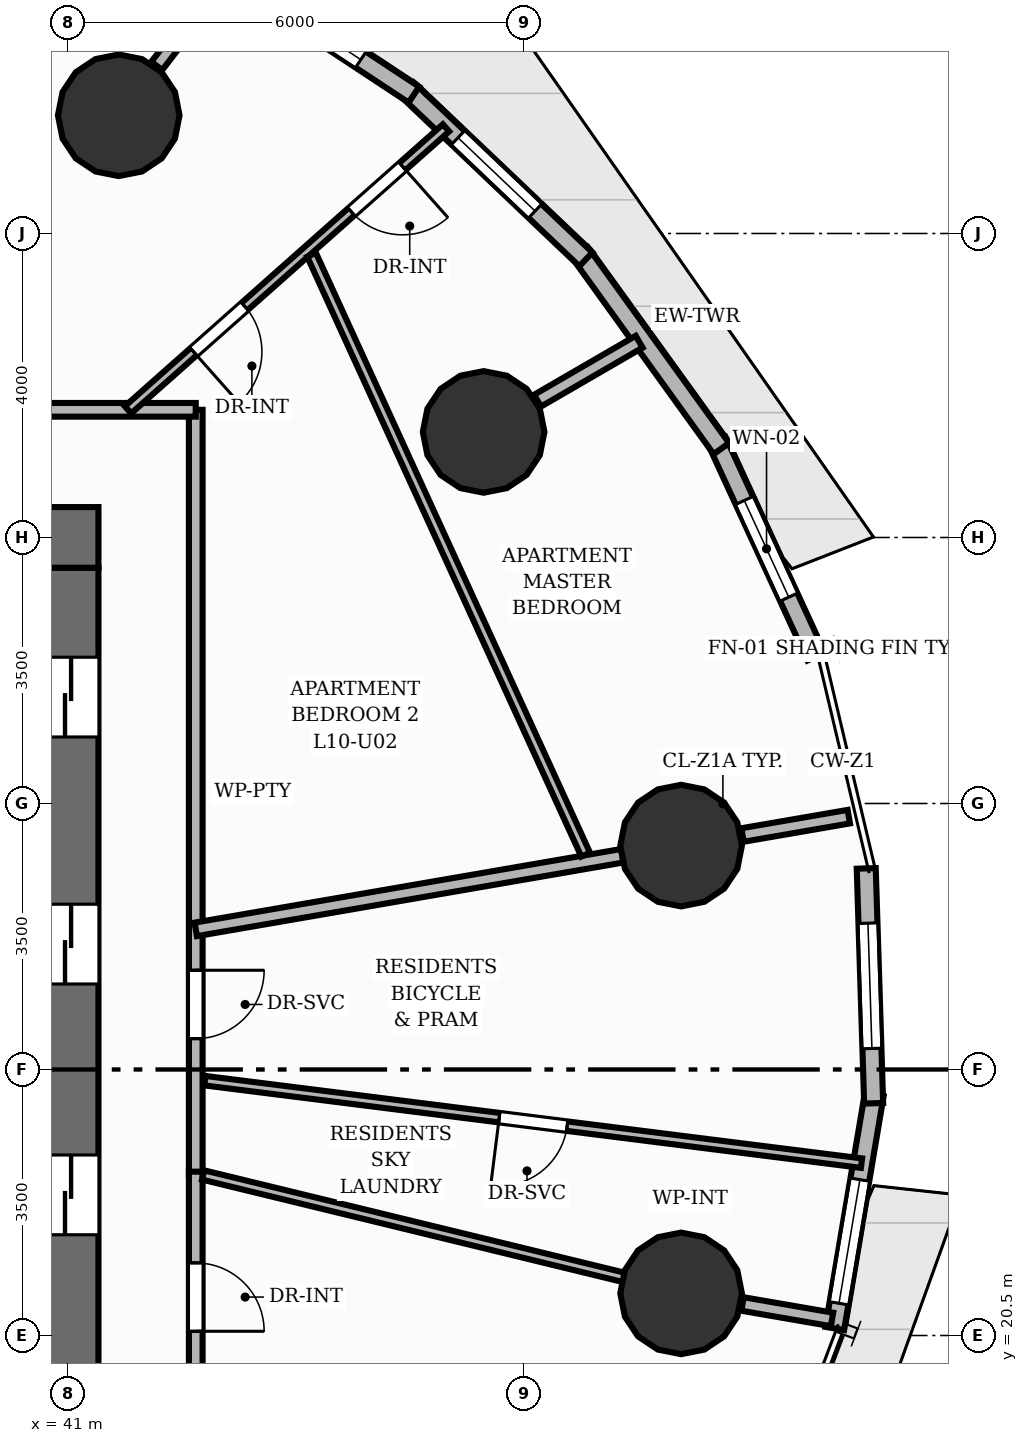
"""IFC4 building model, lengths in metres.
Left out: names, types, materials, properties, quantities, classifications, styles, units other than length and angle.
Written with IfcOpenShell. Run it as: python <this file> out.ifc"""

import sys

from ifc_helpers import new_model, si_unit, direction, frame, frame_2d, origin, origin_2d, place, context, subcontext, project, spatial, rectangle, circle, extrude, element, fill, save


model = new_model("IFC4")
c1 = context("Model", 3, precision=1e-05, world=origin(), true_north=direction((0.0, 1.0)))
c2 = subcontext(c1, "Body", "Model", "MODEL_VIEW")
j1 = project(units=[si_unit("LENGTHUNIT", "METRE"), si_unit("PLANEANGLEUNIT", "RADIAN")], contexts=[c1])
p1 = place(None, origin())
s1 = spatial("IfcSite", under=j1, at=p1, CompositionType="ELEMENT")
p2 = place(p1, origin())
s2 = spatial("IfcBuilding", under=s1, at=p2, CompositionType="ELEMENT")
p3 = place(p2, frame((0.0, 0.0, 37.6)))
s3 = spatial("IfcBuildingStorey", under=s2, at=p3, CompositionType="ELEMENT", Elevation=37.6)
p4 = place(p3, frame((22.6, 31.0, 0.0), z_axis=(0.0, 0.0, 1.0), x_axis=(1.0, 0.0, 0.0)))
e1 = element("IfcWall", 1, at=p4, inside=s3, PredefinedType="SHEAR", context=c2, shape_type="SweptSolid", body=[
    extrude(rectangle(XDim=18.8, YDim=0.8, at=frame_2d((9.4, 0.0))), origin(), (0.0, 0.0, 1.0), 3.2),
])
p5 = place(p4, frame((11.8, 0.0, 0.0)))
e2 = element("IfcOpeningElement", 2, at=p5, cuts=e1, PredefinedType="OPENING", context=c2, shape_type="SweptSolid", body=[
    extrude(rectangle(XDim=1.1, YDim=2.15, at=frame_2d((0.55, 1.075))), frame((0.0, 0.41, 0.0), z_axis=(0.0, -1.0, 0.0), x_axis=(1.0, 0.0, 0.0)), (0.0, 0.0, 1.0), 0.82),
])
p6 = place(p3, frame((41.0, 17.4, 0.0), z_axis=(0.0, 0.0, 1.0), x_axis=(0.0, 1.0, 0.0)))
e3 = element("IfcWall", 3, at=p6, inside=s3, PredefinedType="SHEAR", context=c2, shape_type="SweptSolid", body=[
    extrude(rectangle(XDim=13.2, YDim=0.8, at=frame_2d((6.6, 0.0))), origin(), (0.0, 0.0, 1.0), 3.2),
])
p7 = place(p6, frame((1.175, 0.0, 0.0)))
e4 = element("IfcOpeningElement", 4, at=p7, cuts=e3, PredefinedType="OPENING", context=c2, shape_type="SweptSolid", body=[
    extrude(rectangle(XDim=1.05, YDim=2.15, at=frame_2d((0.525, 1.075))), frame((0.0, 0.41, 0.0), z_axis=(0.0, -1.0, 0.0), x_axis=(1.0, 0.0, 0.0)), (0.0, 0.0, 1.0), 0.82),
])
p8 = place(p6, frame((4.425, 0.0, 0.0)))
e5 = element("IfcOpeningElement", 5, at=p8, cuts=e3, PredefinedType="OPENING", context=c2, shape_type="SweptSolid", body=[
    extrude(rectangle(XDim=1.05, YDim=2.15, at=frame_2d((0.525, 1.075))), frame((0.0, 0.41, 0.0), z_axis=(0.0, -1.0, 0.0), x_axis=(1.0, 0.0, 0.0)), (0.0, 0.0, 1.0), 0.82),
])
p9 = place(p6, frame((7.725, 0.0, 0.0)))
e6 = element("IfcOpeningElement", 6, at=p9, cuts=e3, PredefinedType="OPENING", context=c2, shape_type="SweptSolid", body=[
    extrude(rectangle(XDim=1.05, YDim=2.15, at=frame_2d((0.525, 1.075))), frame((0.0, 0.41, 0.0), z_axis=(0.0, -1.0, 0.0), x_axis=(1.0, 0.0, 0.0)), (0.0, 0.0, 1.0), 0.82),
])
p10 = place(p6, frame((10.975, 0.0, 0.0)))
e7 = element("IfcOpeningElement", 7, at=p10, cuts=e3, PredefinedType="OPENING", context=c2, shape_type="SweptSolid", body=[
    extrude(rectangle(XDim=1.05, YDim=2.15, at=frame_2d((0.525, 1.075))), frame((0.0, 0.41, 0.0), z_axis=(0.0, -1.0, 0.0), x_axis=(1.0, 0.0, 0.0)), (0.0, 0.0, 1.0), 0.82),
])
for number, where, z_axis, x_axis in (
    (8, (49.066, 26.946, 0.0), (0.0, 0.0, 1.0), (1.0, 0.0, 0.0)),
    (9, (46.468, 32.389, 0.0), (0.0, 0.0, 1.0), (1.0, 0.0, 0.0)),
    (10, (41.667, 36.555, 0.0), (0.0, 0.0, 1.0), (1.0, 0.0, 0.0)),
    (11, (49.066, 21.054, 0.0), (0.0, 0.0, 1.0), (1.0, 0.0, 0.0)),
):
    element("IfcColumn", number, at=place(p3, frame(where, z_axis=z_axis, x_axis=x_axis)), inside=s3, PredefinedType="COLUMN", context=c2, shape_type="SweptSolid", body=[
        extrude(circle(Radius=0.8, at=origin_2d()), origin(), (0.0, 0.0, 1.0), 3.2),
    ])
p11 = place(p3, frame((49.538, 32.268, 0.0), z_axis=(0.0, 0.0, 1.0), x_axis=(0.417872029175, -0.908505898293, 0.0)))
e12 = element("IfcWall", 12, at=p11, inside=s3, PredefinedType="SOLIDWALL", context=c2, shape_type="SweptSolid", body=[
    extrude(rectangle(XDim=3.12, YDim=0.25, at=frame_2d((1.56, 0.0))), origin(), (0.0, 0.0, 1.0), 2.96),
])
p12 = place(p11, frame((0.86, 0.0, 0.85)))
e13 = element("IfcOpeningElement", 13, at=p12, cuts=e12, PredefinedType="OPENING", context=c2, shape_type="SweptSolid", body=[
    extrude(rectangle(XDim=1.4, YDim=1.55, at=frame_2d((0.7, 0.775))), frame((0.0, 0.135, 0.0), z_axis=(0.0, -1.0, 0.0), x_axis=(1.0, 0.0, 0.0)), (0.0, 0.0, 1.0), 0.27),
])
p13 = place(p3, frame((47.739, 34.745, 0.0), z_axis=(0.0, 0.0, 1.0), x_axis=(0.584805106467, -0.811173833066, 0.0)))
e14 = element("IfcWall", 14, at=p13, inside=s3, PredefinedType="SOLIDWALL", context=c2, shape_type="SweptSolid", body=[
    extrude(rectangle(XDim=3.174, YDim=0.25, at=frame_2d((1.587, 0.0))), origin(), (0.0, 0.0, 1.0), 2.96),
])
p14 = place(p3, frame((45.462, 36.896, 0.0), z_axis=(0.0, 0.0, 1.0), x_axis=(0.724569059836, -0.689202203659, 0.0)))
e15 = element("IfcWall", 15, at=p14, inside=s3, PredefinedType="SOLIDWALL", context=c2, shape_type="SweptSolid", body=[
    extrude(rectangle(XDim=3.244, YDim=0.25, at=frame_2d((1.622, 0.0))), origin(), (0.0, 0.0, 1.0), 2.96),
])
p15 = place(p14, frame((0.922, 0.0, 0.85)))
e16 = element("IfcOpeningElement", 16, at=p15, cuts=e15, PredefinedType="OPENING", context=c2, shape_type="SweptSolid", body=[
    extrude(rectangle(XDim=1.4, YDim=1.55, at=frame_2d((0.7, 0.775))), frame((0.0, 0.135, 0.0), z_axis=(0.0, -1.0, 0.0), x_axis=(1.0, 0.0, 0.0)), (0.0, 0.0, 1.0), 0.27),
])
p16 = place(p3, frame((42.777, 38.656, 0.0), z_axis=(0.0, 0.0, 1.0), x_axis=(0.834663448541, -0.550760317805, 0.0)))
e17 = element("IfcWall", 17, at=p16, inside=s3, PredefinedType="SOLIDWALL", context=c2, shape_type="SweptSolid", body=[
    extrude(rectangle(XDim=3.323, YDim=0.25, at=frame_2d((1.661, 0.0))), origin(), (0.0, 0.0, 1.0), 2.96),
])
p17 = place(p16, frame((0.836, 0.0, 0.85)))
e18 = element("IfcOpeningElement", 18, at=p17, cuts=e17, PredefinedType="OPENING", context=c2, shape_type="SweptSolid", body=[
    extrude(rectangle(XDim=1.65, YDim=1.55, at=frame_2d((0.825, 0.775))), frame((0.0, 0.135, 0.0), z_axis=(0.0, -1.0, 0.0), x_axis=(1.0, 0.0, 0.0)), (0.0, 0.0, 1.0), 0.27),
])
p18 = place(p3, frame((51.607, 23.67, 0.0), z_axis=(0.0, 0.0, 1.0), x_axis=(-0.166403122634, -0.98605780803, 0.0)))
e19 = element("IfcWall", 19, at=p18, inside=s3, PredefinedType="SOLIDWALL", context=c2, shape_type="SweptSolid", body=[
    extrude(rectangle(XDim=3.121, YDim=0.25, at=frame_2d((1.56, 0.0))), origin(), (0.0, 0.0, 1.0), 2.96),
])
p19 = place(p18, frame((1.135, 0.0, 0.85)))
e20 = element("IfcOpeningElement", 20, at=p19, cuts=e19, PredefinedType="OPENING", context=c2, shape_type="SweptSolid", body=[
    extrude(rectangle(XDim=1.65, YDim=1.29, at=frame_2d((0.825, 0.645))), frame((0.0, 0.135, 0.0), z_axis=(0.0, -1.0, 0.0), x_axis=(1.0, 0.0, 0.0)), (0.0, 0.0, 1.0), 0.27),
])
p20 = place(p3, frame((51.501, 26.646, 0.0), z_axis=(0.0, 0.0, 1.0), x_axis=(0.031584802517, -0.999501075662, 0.0)))
e21 = element("IfcWall", 21, at=p20, inside=s3, PredefinedType="SOLIDWALL", context=c2, shape_type="SweptSolid", body=[
    extrude(rectangle(XDim=3.092, YDim=0.25, at=frame_2d((1.546, 0.0))), origin(), (0.0, 0.0, 1.0), 2.96),
])
p21 = place(p20, frame((0.721, 0.0, 0.85)))
e22 = element("IfcOpeningElement", 22, at=p21, cuts=e21, PredefinedType="OPENING", context=c2, shape_type="SweptSolid", body=[
    extrude(rectangle(XDim=1.65, YDim=1.55, at=frame_2d((0.825, 0.775))), frame((0.0, 0.135, 0.0), z_axis=(0.0, -1.0, 0.0), x_axis=(1.0, 0.0, 0.0)), (0.0, 0.0, 1.0), 0.27),
])
p22 = place(p3, frame((49.874, 27.085, 0.0), z_axis=(0.0, 0.0, 1.0), x_axis=(0.985419363098, 0.170143112797, 0.0)))
e23 = element("IfcWall", 23, at=p22, inside=s3, PredefinedType="PARTITIONING", context=c2, shape_type="SweptSolid", body=[
    extrude(rectangle(XDim=1.419, YDim=0.18, at=frame_2d((0.709, 0.0))), origin(), (0.0, 0.0, 1.0), 2.178),
])
p23 = place(p3, frame((47.177, 32.8, 0.0), z_axis=(0.0, 0.0, 1.0), x_axis=(0.865036673907, 0.501708633369, 0.0)))
e24 = element("IfcWall", 24, at=p23, inside=s3, PredefinedType="PARTITIONING", context=c2, shape_type="SweptSolid", body=[
    extrude(rectangle(XDim=1.545, YDim=0.18, at=frame_2d((0.773, 0.0))), origin(), (0.0, 0.0, 1.0), 2.178),
])
p24 = place(p3, frame((42.167, 37.205, 0.0), z_axis=(0.0, 0.0, 1.0), x_axis=(0.609978856004, 0.792417689876, 0.0)))
e25 = element("IfcWall", 25, at=p24, inside=s3, PredefinedType="PARTITIONING", context=c2, shape_type="SweptSolid", body=[
    extrude(rectangle(XDim=1.496, YDim=0.18, at=frame_2d((0.748, 0.0))), origin(), (0.0, 0.0, 1.0), 2.178),
])
p25 = place(p3, frame((49.874, 20.915, 0.0), z_axis=(0.0, 0.0, 1.0), x_axis=(0.98541644509, -0.170160012181, 0.0)))
e26 = element("IfcWall", 26, at=p25, inside=s3, PredefinedType="PARTITIONING", context=c2, shape_type="SweptSolid", body=[
    extrude(rectangle(XDim=1.195, YDim=0.18, at=frame_2d((0.598, 0.0))), origin(), (0.0, 0.0, 1.0), 2.178),
])
p26 = place(p3, frame((42.68, 32.68, 0.0), z_axis=(0.0, 0.0, 1.0), x_axis=(0.0, -1.0, 0.0)))
e27 = element("IfcWall", 27, at=p26, inside=s3, PredefinedType="PARTITIONING", context=c2, shape_type="SweptSolid", body=[
    extrude(rectangle(XDim=10.065, YDim=0.18, at=frame_2d((5.032, 0.0))), origin(), (0.0, 0.0, 1.0), 2.955),
])
p27 = place(p26, frame((7.374, 0.0, 0.0)))
e28 = element("IfcOpeningElement", 28, at=p27, cuts=e27, PredefinedType="OPENING", context=c2, shape_type="SweptSolid", body=[
    extrude(rectangle(XDim=0.9, YDim=2.1, at=frame_2d((0.45, 1.05))), frame((0.0, 0.1, 0.0), z_axis=(0.0, -1.0, 0.0), x_axis=(1.0, 0.0, 0.0)), (0.0, 0.0, 1.0), 0.2),
])
p28 = place(p3, frame((42.68, 22.656, 0.0), z_axis=(0.0, 0.0, 1.0), x_axis=(0.0, -1.0, 0.0)))
e29 = element("IfcWall", 29, at=p28, inside=s3, PredefinedType="PARTITIONING", context=c2, shape_type="SweptSolid", body=[
    extrude(rectangle(XDim=7.335, YDim=0.18, at=frame_2d((3.668, 0.0))), origin(), (0.0, 0.0, 1.0), 2.955),
])
p29 = place(p28, frame((1.2, 0.0, 0.0)))
e30 = element("IfcOpeningElement", 30, at=p29, cuts=e29, PredefinedType="OPENING", context=c2, shape_type="SweptSolid", body=[
    extrude(rectangle(XDim=0.9, YDim=2.1, at=frame_2d((0.45, 1.05))), frame((0.0, 0.1, 0.0), z_axis=(0.0, -1.0, 0.0), x_axis=(1.0, 0.0, 0.0)), (0.0, 0.0, 1.0), 0.2),
])
p30 = place(p28, frame((4.846, 0.0, 0.0)))
e31 = element("IfcOpeningElement", 31, at=p30, cuts=e29, PredefinedType="OPENING", context=c2, shape_type="SweptSolid", body=[
    extrude(rectangle(XDim=0.9, YDim=2.1, at=frame_2d((0.45, 1.05))), frame((0.0, 0.1, 0.0), z_axis=(0.0, -1.0, 0.0), x_axis=(1.0, 0.0, 0.0)), (0.0, 0.0, 1.0), 0.2),
])
p31 = place(p3, frame((21.32, 32.68, 0.0), z_axis=(0.0, 0.0, 1.0), x_axis=(1.0, 0.0, 0.0)))
e32 = element("IfcWall", 32, at=p31, inside=s3, PredefinedType="PARTITIONING", context=c2, shape_type="SweptSolid", body=[
    extrude(rectangle(XDim=21.36, YDim=0.18, at=frame_2d((10.68, 0.0))), origin(), (0.0, 0.0, 1.0), 2.955),
])
p32 = place(p31, frame((17.013, 0.0, 0.0)))
e33 = element("IfcOpeningElement", 33, at=p32, cuts=e32, PredefinedType="OPENING", context=c2, shape_type="SweptSolid", body=[
    extrude(rectangle(XDim=1.05, YDim=2.15, at=frame_2d((0.525, 1.075))), frame((0.0, 0.1, 0.0), z_axis=(0.0, -1.0, 0.0), x_axis=(1.0, 0.0, 0.0)), (0.0, 0.0, 1.0), 0.2),
])
p33 = place(p31, frame((5.82, 0.0, 0.0)))
e34 = element("IfcOpeningElement", 34, at=p33, cuts=e32, PredefinedType="OPENING", context=c2, shape_type="SweptSolid", body=[
    extrude(rectangle(XDim=1.05, YDim=2.15, at=frame_2d((0.525, 1.075))), frame((0.0, 0.1, 0.0), z_axis=(0.0, -1.0, 0.0), x_axis=(1.0, 0.0, 0.0)), (0.0, 0.0, 1.0), 0.2),
])
p34 = place(p3, frame((51.439, 22.768, 0.0), z_axis=(0.0, 0.0, 1.0), x_axis=(-0.992204813033, 0.124617851825, 0.0)))
e35 = element("IfcWall", 35, at=p34, inside=s3, PredefinedType="PARTITIONING", context=c2, shape_type="SweptSolid", body=[
    extrude(rectangle(XDim=8.708, YDim=0.125, at=frame_2d((4.354, 0.0))), origin(), (0.0, 0.0, 1.0), 2.641),
])
p35 = place(p34, frame((3.904, 0.0, 0.0)))
e36 = element("IfcOpeningElement", 36, at=p35, cuts=e35, PredefinedType="OPENING", context=c2, shape_type="SweptSolid", body=[
    extrude(rectangle(XDim=0.9, YDim=2.1, at=frame_2d((0.45, 1.05))), frame((0.0, 0.073, 0.0), z_axis=(0.0, -1.0, 0.0), x_axis=(1.0, 0.0, 0.0)), (0.0, 0.0, 1.0), 0.145),
])
p36 = place(p3, frame((42.68, 25.844, 0.0), z_axis=(0.0, 0.0, 1.0), x_axis=(0.98542122422, 0.170132333364, 0.0)))
e37 = element("IfcWall", 37, at=p36, inside=s3, PredefinedType="PARTITIONING", context=c2, shape_type="SweptSolid", body=[
    extrude(rectangle(XDim=5.694, YDim=0.18, at=frame_2d((2.847, 0.0))), origin(), (0.0, 0.0, 1.0), 2.178),
])
p37 = place(p3, frame((42.777, 22.612, 0.0), z_axis=(0.0, 0.0, 1.0), x_axis=(0.971633604644, -0.236491307083, 0.0)))
e38 = element("IfcWall", 38, at=p37, inside=s3, PredefinedType="PARTITIONING", context=c2, shape_type="SweptSolid", body=[
    extrude(rectangle(XDim=5.707, YDim=0.125, at=frame_2d((2.854, 0.0))), origin(), (0.0, 0.0, 1.0), 2.178),
])
p38 = place(p3, frame((45.973, 36.39, 0.0), z_axis=(0.0, 0.0, 1.0), x_axis=(-0.748208515509, -0.663463651845, 0.0)))
e39 = element("IfcWall", 39, at=p38, inside=s3, PredefinedType="PARTITIONING", context=c2, shape_type="SweptSolid", body=[
    extrude(rectangle(XDim=5.592, YDim=0.125, at=frame_2d((2.796, 0.0))), origin(), (0.0, 0.0, 1.0), 2.955),
])
p39 = place(p38, frame((0.765, 0.0, 0.0)))
e40 = element("IfcOpeningElement", 40, at=p39, cuts=e39, PredefinedType="OPENING", context=c2, shape_type="SweptSolid", body=[
    extrude(rectangle(XDim=0.9, YDim=2.1, at=frame_2d((0.45, 1.05))), frame((0.0, 0.073, 0.0), z_axis=(0.0, -1.0, 0.0), x_axis=(1.0, 0.0, 0.0)), (0.0, 0.0, 1.0), 0.145),
])
p40 = place(p38, frame((3.54, 0.0, 0.0)))
e41 = element("IfcOpeningElement", 41, at=p40, cuts=e39, PredefinedType="OPENING", context=c2, shape_type="SweptSolid", body=[
    extrude(rectangle(XDim=0.9, YDim=2.1, at=frame_2d((0.45, 1.05))), frame((0.0, 0.073, 0.0), z_axis=(0.0, -1.0, 0.0), x_axis=(1.0, 0.0, 0.0)), (0.0, 0.0, 1.0), 0.145),
])
p41 = place(p3, frame((47.81, 26.827, 0.0), z_axis=(0.0, 0.0, 1.0), x_axis=(-0.41559351113, 0.909550456823, 0.0)))
e42 = element("IfcWall", 42, at=p41, inside=s3, PredefinedType="PARTITIONING", context=c2, shape_type="SweptSolid", body=[
    extrude(rectangle(XDim=8.677, YDim=0.125, at=frame_2d((4.338, 0.0))), origin(), (0.0, 0.0, 1.0), 2.328),
])
p42 = place(p12, origin())
e43 = element("IfcWindow", 43, at=p42, inside=s3, PartitioningType="SINGLE_PANEL", PredefinedType="WINDOW", context=c2, shape_type="SweptSolid", body=[
    extrude(rectangle(XDim=1.4, YDim=1.55, at=frame_2d((0.7, 0.775))), frame((0.0, 0.03, 0.0), z_axis=(0.0, -1.0, 0.0), x_axis=(1.0, 0.0, 0.0)), (0.0, 0.0, 1.0), 0.06),
])
fill(e13, e43)
p43 = place(p15, origin())
e44 = element("IfcWindow", 44, at=p43, inside=s3, PartitioningType="SINGLE_PANEL", PredefinedType="WINDOW", context=c2, shape_type="SweptSolid", body=[
    extrude(rectangle(XDim=1.4, YDim=1.55, at=frame_2d((0.7, 0.775))), frame((0.0, 0.03, 0.0), z_axis=(0.0, -1.0, 0.0), x_axis=(1.0, 0.0, 0.0)), (0.0, 0.0, 1.0), 0.06),
])
fill(e16, e44)
p44 = place(p17, origin())
e45 = element("IfcWindow", 45, at=p44, inside=s3, PartitioningType="SINGLE_PANEL", PredefinedType="WINDOW", context=c2, shape_type="SweptSolid", body=[
    extrude(rectangle(XDim=1.65, YDim=1.55, at=frame_2d((0.825, 0.775))), frame((0.0, 0.03, 0.0), z_axis=(0.0, -1.0, 0.0), x_axis=(1.0, 0.0, 0.0)), (0.0, 0.0, 1.0), 0.06),
])
fill(e18, e45)
p45 = place(p19, origin())
e46 = element("IfcWindow", 46, at=p45, inside=s3, PartitioningType="SINGLE_PANEL", PredefinedType="WINDOW", context=c2, shape_type="SweptSolid", body=[
    extrude(rectangle(XDim=1.65, YDim=1.29, at=frame_2d((0.825, 0.645))), frame((0.0, 0.03, 0.0), z_axis=(0.0, -1.0, 0.0), x_axis=(1.0, 0.0, 0.0)), (0.0, 0.0, 1.0), 0.06),
])
fill(e20, e46)
p46 = place(p21, origin())
e47 = element("IfcWindow", 47, at=p46, inside=s3, PartitioningType="SINGLE_PANEL", PredefinedType="WINDOW", context=c2, shape_type="SweptSolid", body=[
    extrude(rectangle(XDim=1.65, YDim=1.55, at=frame_2d((0.825, 0.775))), frame((0.0, 0.03, 0.0), z_axis=(0.0, -1.0, 0.0), x_axis=(1.0, 0.0, 0.0)), (0.0, 0.0, 1.0), 0.06),
])
fill(e22, e47)
p47 = place(p8, origin())
e48 = element("IfcDoor", 48, at=p47, inside=s3, OperationType="DOUBLE_DOOR_SLIDING", PredefinedType="DOOR", context=c2, shape_type="SweptSolid", body=[
    extrude(rectangle(XDim=1.05, YDim=2.15, at=frame_2d((0.525, 1.075))), frame((0.0, 0.025, 0.0), z_axis=(0.0, -1.0, 0.0), x_axis=(1.0, 0.0, 0.0)), (0.0, 0.0, 1.0), 0.05),
])
fill(e5, e48)
p48 = place(p9, origin())
e49 = element("IfcDoor", 49, at=p48, inside=s3, OperationType="DOUBLE_DOOR_SLIDING", PredefinedType="DOOR", context=c2, shape_type="SweptSolid", body=[
    extrude(rectangle(XDim=1.05, YDim=2.15, at=frame_2d((0.525, 1.075))), frame((0.0, 0.025, 0.0), z_axis=(0.0, -1.0, 0.0), x_axis=(1.0, 0.0, 0.0)), (0.0, 0.0, 1.0), 0.05),
])
fill(e6, e49)
p49 = place(p10, origin())
e50 = element("IfcDoor", 50, at=p49, inside=s3, OperationType="DOUBLE_DOOR_SLIDING", PredefinedType="DOOR", context=c2, shape_type="SweptSolid", body=[
    extrude(rectangle(XDim=1.05, YDim=2.15, at=frame_2d((0.525, 1.075))), frame((0.0, 0.025, 0.0), z_axis=(0.0, -1.0, 0.0), x_axis=(1.0, 0.0, 0.0)), (0.0, 0.0, 1.0), 0.05),
])
fill(e7, e50)
p50 = place(p27, origin())
e51 = element("IfcDoor", 51, at=p50, inside=s3, OperationType="SINGLE_SWING_LEFT", PredefinedType="DOOR", context=c2, shape_type="SweptSolid", body=[
    extrude(rectangle(XDim=0.9, YDim=2.1, at=frame_2d((0.45, 1.05))), frame((0.0, 0.025, 0.0), z_axis=(0.0, -1.0, 0.0), x_axis=(1.0, 0.0, 0.0)), (0.0, 0.0, 1.0), 0.05),
])
fill(e28, e51)
p51 = place(p29, origin())
e52 = element("IfcDoor", 52, at=p51, inside=s3, OperationType="SINGLE_SWING_RIGHT", PredefinedType="DOOR", context=c2, shape_type="SweptSolid", body=[
    extrude(rectangle(XDim=0.9, YDim=2.1, at=frame_2d((0.45, 1.05))), frame((0.0, 0.025, 0.0), z_axis=(0.0, -1.0, 0.0), x_axis=(1.0, 0.0, 0.0)), (0.0, 0.0, 1.0), 0.05),
])
fill(e30, e52)
p52 = place(p35, origin())
e53 = element("IfcDoor", 53, at=p52, inside=s3, OperationType="SINGLE_SWING_RIGHT", PredefinedType="DOOR", context=c2, shape_type="SweptSolid", body=[
    extrude(rectangle(XDim=0.9, YDim=2.1, at=frame_2d((0.45, 1.05))), frame((0.0, 0.025, 0.0), z_axis=(0.0, -1.0, 0.0), x_axis=(1.0, 0.0, 0.0)), (0.0, 0.0, 1.0), 0.05),
])
fill(e36, e53)
p53 = place(p39, origin())
e54 = element("IfcDoor", 54, at=p53, inside=s3, OperationType="SINGLE_SWING_LEFT", PredefinedType="DOOR", context=c2, shape_type="SweptSolid", body=[
    extrude(rectangle(XDim=0.9, YDim=2.1, at=frame_2d((0.45, 1.05))), frame((0.0, 0.025, 0.0), z_axis=(0.0, -1.0, 0.0), x_axis=(1.0, 0.0, 0.0)), (0.0, 0.0, 1.0), 0.05),
])
fill(e40, e54)
p54 = place(p40, origin())
e55 = element("IfcDoor", 55, at=p54, inside=s3, OperationType="SINGLE_SWING_RIGHT", PredefinedType="DOOR", context=c2, shape_type="SweptSolid", body=[
    extrude(rectangle(XDim=0.9, YDim=2.1, at=frame_2d((0.45, 1.05))), frame((0.0, 0.025, 0.0), z_axis=(0.0, -1.0, 0.0), x_axis=(1.0, 0.0, 0.0)), (0.0, 0.0, 1.0), 0.05),
])
fill(e41, e55)
save(model, sys.argv[1])
